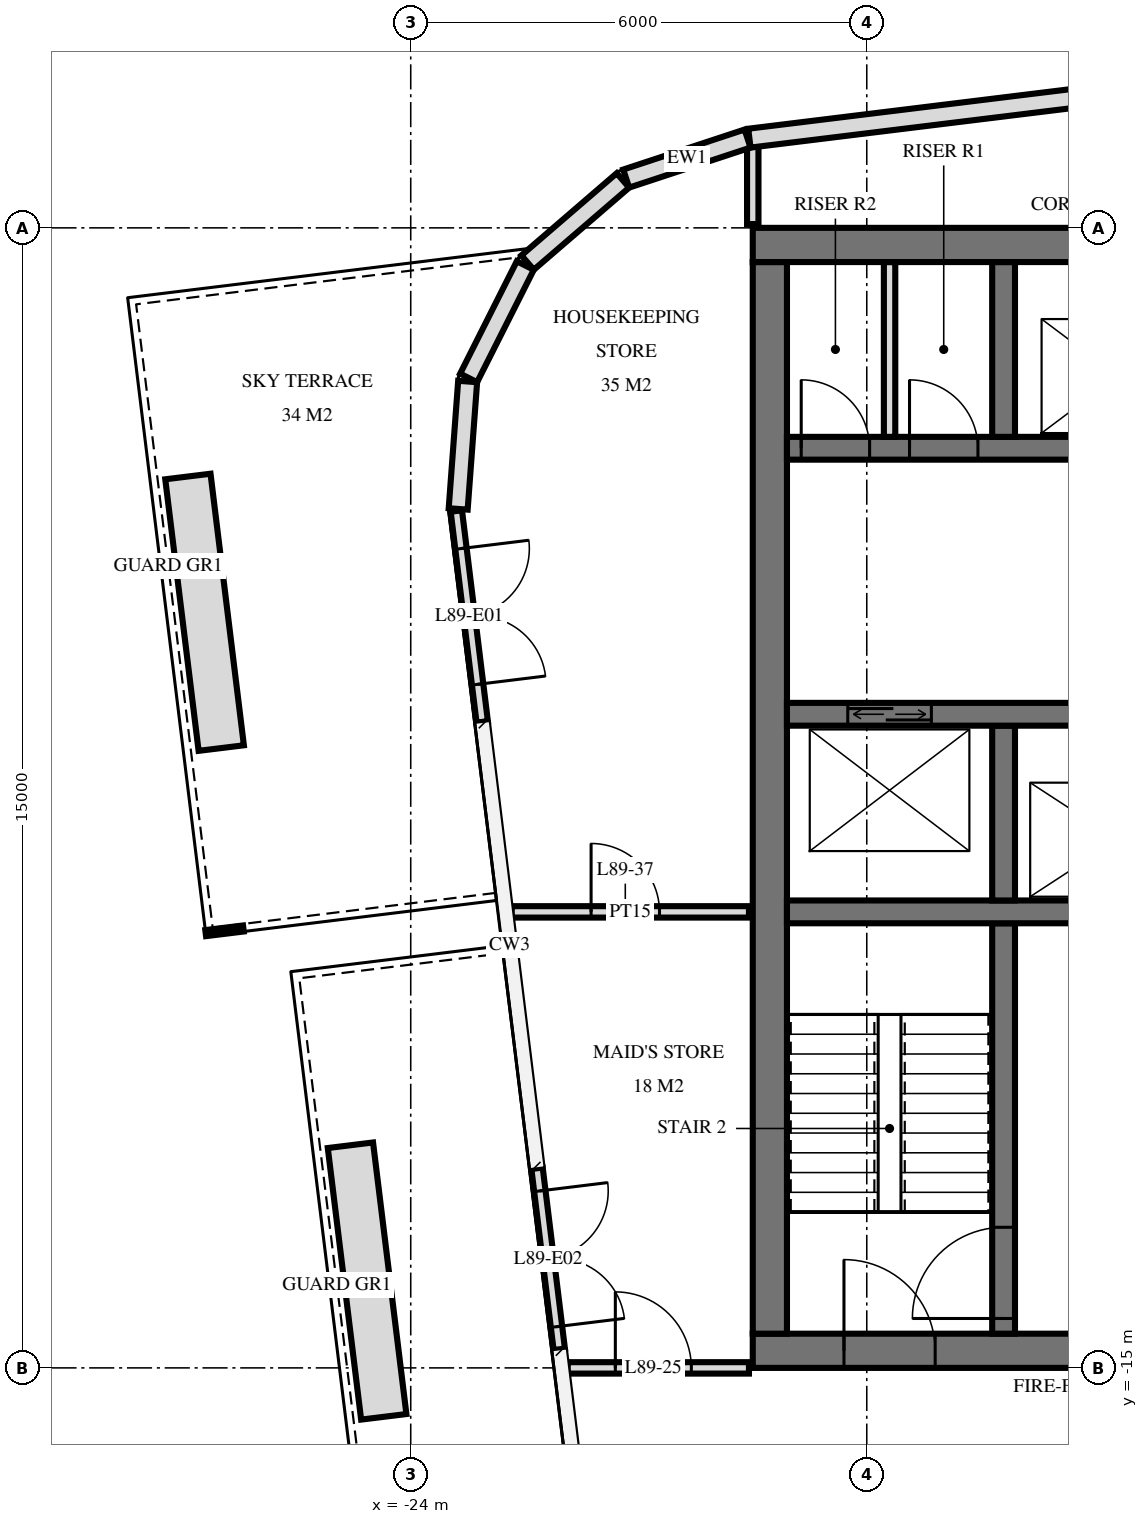
"""IFC4 building model, lengths in metres.
Left out: names, types, materials, properties, quantities, classifications, styles, units other than length and angle.
Written with IfcOpenShell. Run it as: python <this file> out.ifc"""

import sys

from ifc_helpers import new_model, si_unit, direction, frame, frame_2d, origin, place, context, subcontext, project, spatial, rectangle, extrude, element, fill, save


model = new_model("IFC4")
c1 = context("Model", 3, precision=1e-05, world=origin(), true_north=direction((0.0, 1.0)))
c2 = subcontext(c1, "Body", "Model", "MODEL_VIEW")
j1 = project(units=[si_unit("LENGTHUNIT", "METRE"), si_unit("PLANEANGLEUNIT", "RADIAN")], contexts=[c1])
p1 = place(None, origin())
s1 = spatial("IfcSite", under=j1, at=p1, CompositionType="ELEMENT")
p2 = place(p1, origin())
s2 = spatial("IfcBuilding", under=s1, at=p2, CompositionType="ELEMENT")
p3 = place(p2, frame((0.0, 0.0, 338.6)))
s3 = spatial("IfcBuildingStorey", under=s2, at=p3, CompositionType="ELEMENT", Elevation=338.6)
p4 = place(p3, frame((-19.5, -0.225, 0.0), z_axis=(0.0, 0.0, 1.0), x_axis=(1.0, 0.0, 0.0)))
e1 = element("IfcWall", 1, at=p4, inside=s3, PredefinedType="SHEAR", context=c2, shape_type="SweptSolid", body=[
    extrude(rectangle(XDim=9.5, YDim=0.45, at=frame_2d((4.75, 0.0))), origin(), (0.0, 0.0, 1.0), 4.0),
])
p5 = place(p3, frame((-19.5, -14.775, 0.0), z_axis=(0.0, 0.0, 1.0), x_axis=(1.0, 0.0, 0.0)))
e2 = element("IfcWall", 2, at=p5, inside=s3, PredefinedType="SHEAR", context=c2, shape_type="SweptSolid", body=[
    extrude(rectangle(XDim=9.5, YDim=0.45, at=frame_2d((4.75, 0.0))), origin(), (0.0, 0.0, 1.0), 4.0),
])
p6 = place(p5, frame((1.2, 0.0, 0.0)))
e3 = element("IfcOpeningElement", 3, at=p6, cuts=e2, PredefinedType="OPENING", context=c2, shape_type="SweptSolid", body=[
    extrude(rectangle(XDim=1.2, YDim=2.1, at=frame_2d((0.6, 1.05))), frame((0.0, 0.235, 0.0), z_axis=(0.0, -1.0, 0.0), x_axis=(1.0, 0.0, 0.0)), (0.0, 0.0, 1.0), 0.47),
])
p7 = place(p5, frame((4.25, 0.0, 0.0)))
e4 = element("IfcOpeningElement", 4, at=p7, cuts=e2, PredefinedType="OPENING", context=c2, shape_type="SweptSolid", body=[
    extrude(rectangle(XDim=1.1, YDim=2.1, at=frame_2d((0.55, 1.05))), frame((0.0, 0.235, 0.0), z_axis=(0.0, -1.0, 0.0), x_axis=(1.0, 0.0, 0.0)), (0.0, 0.0, 1.0), 0.47),
])
p8 = place(p3, frame((-19.275, -14.55, 0.0), z_axis=(0.0, 0.0, 1.0), x_axis=(0.0, 1.0, 0.0)))
e5 = element("IfcWall", 5, at=p8, inside=s3, PredefinedType="SHEAR", context=c2, shape_type="SweptSolid", body=[
    extrude(rectangle(XDim=14.1, YDim=0.45, at=frame_2d((7.05, 0.0))), origin(), (0.0, 0.0, 1.0), 4.0),
])
p9 = place(p3, frame((-19.05, -2.9, 0.0), z_axis=(0.0, 0.0, 1.0), x_axis=(1.0, 0.0, 0.0)))
e6 = element("IfcWall", 6, at=p9, inside=s3, PredefinedType="SHEAR", context=c2, shape_type="SweptSolid", body=[
    extrude(rectangle(XDim=8.7, YDim=0.3, at=frame_2d((4.35, 0.0))), origin(), (0.0, 0.0, 1.0), 4.0),
])
p10 = place(p9, frame((6.8, 0.0, 0.0)))
e7 = element("IfcOpeningElement", 7, at=p10, cuts=e6, PredefinedType="OPENING", context=c2, shape_type="SweptSolid", body=[
    extrude(rectangle(XDim=1.1, YDim=2.1, at=frame_2d((0.55, 1.05))), frame((0.0, 0.16, 0.0), z_axis=(0.0, -1.0, 0.0), x_axis=(1.0, 0.0, 0.0)), (0.0, 0.0, 1.0), 0.32),
])
p11 = place(p9, frame((3.8, 0.0, 0.0)))
e8 = element("IfcOpeningElement", 8, at=p11, cuts=e6, PredefinedType="OPENING", context=c2, shape_type="SweptSolid", body=[
    extrude(rectangle(XDim=1.1, YDim=2.1, at=frame_2d((0.55, 1.05))), frame((0.0, 0.16, 0.0), z_axis=(0.0, -1.0, 0.0), x_axis=(1.0, 0.0, 0.0)), (0.0, 0.0, 1.0), 0.32),
])
p12 = place(p9, frame((1.613, 0.0, 0.0)))
e9 = element("IfcOpeningElement", 9, at=p12, cuts=e6, PredefinedType="OPENING", context=c2, shape_type="SweptSolid", body=[
    extrude(rectangle(XDim=0.9, YDim=2.1, at=frame_2d((0.45, 1.05))), frame((0.0, 0.16, 0.0), z_axis=(0.0, -1.0, 0.0), x_axis=(1.0, 0.0, 0.0)), (0.0, 0.0, 1.0), 0.32),
])
p13 = place(p9, frame((0.188, 0.0, 0.0)))
e10 = element("IfcOpeningElement", 10, at=p13, cuts=e6, PredefinedType="OPENING", context=c2, shape_type="SweptSolid", body=[
    extrude(rectangle(XDim=0.9, YDim=2.1, at=frame_2d((0.45, 1.05))), frame((0.0, 0.16, 0.0), z_axis=(0.0, -1.0, 0.0), x_axis=(1.0, 0.0, 0.0)), (0.0, 0.0, 1.0), 0.32),
])
p14 = place(p3, frame((-19.05, -6.4, 0.0), z_axis=(0.0, 0.0, 1.0), x_axis=(1.0, 0.0, 0.0)))
e11 = element("IfcWall", 11, at=p14, inside=s3, PredefinedType="SHEAR", context=c2, shape_type="SweptSolid", body=[
    extrude(rectangle(XDim=8.7, YDim=0.3, at=frame_2d((4.35, 0.0))), origin(), (0.0, 0.0, 1.0), 4.0),
])
p15 = place(p14, frame((6.8, 0.0, 0.0)))
e12 = element("IfcOpeningElement", 12, at=p15, cuts=e11, PredefinedType="OPENING", context=c2, shape_type="SweptSolid", body=[
    extrude(rectangle(XDim=1.1, YDim=2.1, at=frame_2d((0.55, 1.05))), frame((0.0, 0.16, 0.0), z_axis=(0.0, -1.0, 0.0), x_axis=(1.0, 0.0, 0.0)), (0.0, 0.0, 1.0), 0.32),
])
p16 = place(p14, frame((0.8, 0.0, 0.0)))
e13 = element("IfcOpeningElement", 13, at=p16, cuts=e11, PredefinedType="OPENING", context=c2, shape_type="SweptSolid", body=[
    extrude(rectangle(XDim=1.1, YDim=2.1, at=frame_2d((0.55, 1.05))), frame((0.0, 0.16, 0.0), z_axis=(0.0, -1.0, 0.0), x_axis=(1.0, 0.0, 0.0)), (0.0, 0.0, 1.0), 0.32),
])
p17 = place(p3, frame((-19.05, -9.0, 0.0), z_axis=(0.0, 0.0, 1.0), x_axis=(1.0, 0.0, 0.0)))
e14 = element("IfcWall", 14, at=p17, inside=s3, PredefinedType="SHEAR", context=c2, shape_type="SweptSolid", body=[
    extrude(rectangle(XDim=8.7, YDim=0.3, at=frame_2d((4.35, 0.0))), origin(), (0.0, 0.0, 1.0), 4.0),
])
p18 = place(p17, frame((3.8, 0.0, 0.0)))
e15 = element("IfcOpeningElement", 15, at=p18, cuts=e14, PredefinedType="OPENING", context=c2, shape_type="SweptSolid", body=[
    extrude(rectangle(XDim=1.1, YDim=2.1, at=frame_2d((0.55, 1.05))), frame((0.0, 0.16, 0.0), z_axis=(0.0, -1.0, 0.0), x_axis=(1.0, 0.0, 0.0)), (0.0, 0.0, 1.0), 0.32),
])
for number, where, z_axis, x_axis in (
    (16, (-16.2, -2.75, 0.0), (0.0, 0.0, 1.0), (0.0, 1.0, 0.0)),
    (17, (-16.2, -8.85, 0.0), (0.0, 0.0, 1.0), (0.0, 1.0, 0.0)),
):
    element("IfcWall", number, at=place(p3, frame(where, z_axis=z_axis, x_axis=x_axis)), inside=s3, PredefinedType="SHEAR", context=c2, shape_type="SweptSolid", body=[
        extrude(rectangle(XDim=2.3, YDim=0.3, at=frame_2d((1.15, 0.0))), origin(), (0.0, 0.0, 1.0), 4.0),
    ])
p19 = place(p3, frame((-16.2, -14.55, 0.0), z_axis=(0.0, 0.0, 1.0), x_axis=(0.0, 1.0, 0.0)))
e18 = element("IfcWall", 18, at=p19, inside=s3, PredefinedType="SHEAR", context=c2, shape_type="SweptSolid", body=[
    extrude(rectangle(XDim=5.4, YDim=0.3, at=frame_2d((2.7, 0.0))), origin(), (0.0, 0.0, 1.0), 4.0),
])
p20 = place(p19, frame((0.2, 0.0, 0.0)))
e19 = element("IfcOpeningElement", 19, at=p20, cuts=e18, PredefinedType="OPENING", context=c2, shape_type="SweptSolid", body=[
    extrude(rectangle(XDim=1.2, YDim=2.1, at=frame_2d((0.6, 1.05))), frame((0.0, 0.16, 0.0), z_axis=(0.0, -1.0, 0.0), x_axis=(1.0, 0.0, 0.0)), (0.0, 0.0, 1.0), 0.32),
])
p21 = place(p3, frame((16.138, 5.561, 0.0), z_axis=(0.0, 0.0, 1.0), x_axis=(-0.992546726876, -0.121864658405, 0.0)))
e20 = element("IfcWall", 20, at=p21, inside=s3, PredefinedType="SOLIDWALL", context=c2, shape_type="SweptSolid", body=[
    extrude(rectangle(XDim=35.951, YDim=0.25, at=frame_2d((17.975, 0.0))), origin(), (0.0, 0.0, 1.0), 3.72),
])
p22 = place(p3, frame((-19.568, 1.175, 0.0), z_axis=(0.0, 0.0, 1.0), x_axis=(-0.949694735798, -0.313177120489, 0.0)))
e21 = element("IfcWall", 21, at=p22, inside=s3, PredefinedType="SOLIDWALL", context=c2, shape_type="SweptSolid", body=[
    extrude(rectangle(XDim=1.681, YDim=0.25, at=frame_2d((0.841, 0.0))), origin(), (0.0, 0.0, 1.0), 3.72),
])
p23 = place(p3, frame((-21.208, 0.624, 0.0), z_axis=(0.0, 0.0, 1.0), x_axis=(-0.757568315466, -0.652755886531, 0.0)))
e22 = element("IfcWall", 22, at=p23, inside=s3, PredefinedType="SOLIDWALL", context=c2, shape_type="SweptSolid", body=[
    extrude(rectangle(XDim=1.656, YDim=0.25, at=frame_2d((0.828, 0.0))), origin(), (0.0, 0.0, 1.0), 3.72),
])
p24 = place(p3, frame((-22.493, -0.495, 0.0), z_axis=(0.0, 0.0, 1.0), x_axis=(-0.449982385812, -0.893037430604, 0.0)))
e23 = element("IfcWall", 23, at=p24, inside=s3, PredefinedType="SOLIDWALL", context=c2, shape_type="SweptSolid", body=[
    extrude(rectangle(XDim=1.656, YDim=0.25, at=frame_2d((0.828, 0.0))), origin(), (0.0, 0.0, 1.0), 3.72),
])
p25 = place(p3, frame((-23.251, -2.021, 0.0), z_axis=(0.0, 0.0, 1.0), x_axis=(-0.074053534713, -0.997254267475, 0.0)))
e24 = element("IfcWall", 24, at=p25, inside=s3, PredefinedType="SOLIDWALL", context=c2, shape_type="SweptSolid", body=[
    extrude(rectangle(XDim=1.681, YDim=0.25, at=frame_2d((0.841, 0.0))), origin(), (0.0, 0.0, 1.0), 3.72),
])
p26 = place(p3, frame((-23.4, -3.726, 0.0), z_axis=(0.0, 0.0, 1.0), x_axis=(0.121830924856, -0.992550868091, 0.0)))
e25 = element("IfcWall", 25, at=p26, inside=s3, PredefinedType="USERDEFINED", context=c2, shape_type="SweptSolid", body=[
    extrude(rectangle(XDim=2.795, YDim=0.15, at=frame_2d((1.398, 0.0))), origin(), (0.0, 0.0, 1.0), 3.72),
])
p27 = place(p26, frame((0.498, 0.0, 0.0)))
e26 = element("IfcOpeningElement", 26, at=p27, cuts=e25, PredefinedType="OPENING", context=c2, shape_type="SweptSolid", body=[
    extrude(rectangle(XDim=1.8, YDim=2.4, at=frame_2d((0.9, 1.2))), frame((0.0, 0.085, 0.0), z_axis=(0.0, -1.0, 0.0), x_axis=(1.0, 0.0, 0.0)), (0.0, 0.0, 1.0), 0.17),
])
p28 = place(p3, frame((-22.338, -12.374, 0.0), z_axis=(0.0, 0.0, 1.0), x_axis=(0.121868445399, -0.992546261902, 0.0)))
e27 = element("IfcWall", 27, at=p28, inside=s3, PredefinedType="USERDEFINED", context=c2, shape_type="SweptSolid", body=[
    extrude(rectangle(XDim=2.4, YDim=0.15, at=frame_2d((1.2, 0.0))), origin(), (0.0, 0.0, 1.0), 3.72),
])
p29 = place(p28, frame((0.3, 0.0, 0.0)))
e28 = element("IfcOpeningElement", 28, at=p29, cuts=e27, PredefinedType="OPENING", context=c2, shape_type="SweptSolid", body=[
    extrude(rectangle(XDim=1.8, YDim=2.4, at=frame_2d((0.9, 1.2))), frame((0.0, 0.085, 0.0), z_axis=(0.0, -1.0, 0.0), x_axis=(1.0, 0.0, 0.0)), (0.0, 0.0, 1.0), 0.17),
])
for number, where, z_axis, x_axis in (
    (29, (-24.355, -15.644, 0.0), (0.0, 0.0, 1.0), (-0.122, 0.993, 0.0)),
    (30, (-26.493, -6.845, 0.0), (0.0, 0.0, 1.0), (-0.122, 0.993, 0.0)),
):
    element("IfcWall", number, at=place(p3, frame(where, z_axis=z_axis, x_axis=x_axis)), inside=s3, PredefinedType="USERDEFINED", context=c2, shape_type="SweptSolid", body=[
        extrude(rectangle(XDim=3.6, YDim=0.6, at=frame_2d((1.8, 0.0))), origin(), (0.0, 0.0, 1.0), 0.65),
    ])
p30 = place(p3, frame((-17.7, -2.75, 0.0), z_axis=(0.0, 0.0, 1.0), x_axis=(0.0, 1.0, 0.0)))
e31 = element("IfcWall", 31, at=p30, inside=s3, PredefinedType="PARTITIONING", context=c2, shape_type="SweptSolid", body=[
    extrude(rectangle(XDim=2.3, YDim=0.15, at=frame_2d((1.15, 0.0))), origin(), (0.0, 0.0, 1.0), 3.7),
])
p31 = place(p3, frame((-19.5, 0.05, 0.0), z_axis=(0.0, 0.0, 1.0), x_axis=(0.0, 1.0, 0.0)))
e32 = element("IfcWall", 32, at=p31, inside=s3, PredefinedType="PARTITIONING", context=c2, shape_type="SweptSolid", body=[
    extrude(rectangle(XDim=1.08, YDim=0.15, at=frame_2d((0.54, 0.0))), origin(), (0.0, 0.0, 1.0), 3.72),
])
p32 = place(p3, frame((-21.935, -15.0, 0.0), z_axis=(0.0, 0.0, 1.0), x_axis=(1.0, 0.0, 0.0)))
e33 = element("IfcWall", 33, at=p32, inside=s3, PredefinedType="PARTITIONING", context=c2, shape_type="SweptSolid", body=[
    extrude(rectangle(XDim=2.385, YDim=0.15, at=frame_2d((1.192, 0.0))), origin(), (0.0, 0.0, 1.0), 3.72),
])
p33 = place(p32, frame((0.627, 0.0, 0.0)))
e34 = element("IfcOpeningElement", 34, at=p33, cuts=e33, PredefinedType="OPENING", context=c2, shape_type="SweptSolid", body=[
    extrude(rectangle(XDim=1.0, YDim=2.1, at=frame_2d((0.5, 1.05))), frame((0.0, 0.085, 0.0), z_axis=(0.0, -1.0, 0.0), x_axis=(1.0, 0.0, 0.0)), (0.0, 0.0, 1.0), 0.17),
])
p34 = place(p3, frame((-22.672, -9.0, 0.0), z_axis=(0.0, 0.0, 1.0), x_axis=(1.0, 0.0, 0.0)))
e35 = element("IfcWall", 35, at=p34, inside=s3, PredefinedType="PARTITIONING", context=c2, shape_type="SweptSolid", body=[
    extrude(rectangle(XDim=3.122, YDim=0.15, at=frame_2d((1.561, 0.0))), origin(), (0.0, 0.0, 1.0), 3.72),
])
p35 = place(p34, frame((1.045, 0.0, 0.0)))
e36 = element("IfcOpeningElement", 36, at=p35, cuts=e35, PredefinedType="OPENING", context=c2, shape_type="SweptSolid", body=[
    extrude(rectangle(XDim=0.9, YDim=2.1, at=frame_2d((0.45, 1.05))), frame((0.0, 0.085, 0.0), z_axis=(0.0, -1.0, 0.0), x_axis=(1.0, 0.0, 0.0)), (0.0, 0.0, 1.0), 0.17),
])
p36 = place(p27, origin())
e37 = element("IfcDoor", 37, at=p36, inside=s3, OperationType="DOUBLE_DOOR_SINGLE_SWING", PredefinedType="DOOR", context=c2, shape_type="SweptSolid", body=[
    extrude(rectangle(XDim=1.8, YDim=2.4, at=frame_2d((0.9, 1.2))), frame((0.0, 0.025, 0.0), z_axis=(0.0, -1.0, 0.0), x_axis=(1.0, 0.0, 0.0)), (0.0, 0.0, 1.0), 0.05),
])
fill(e26, e37)
p37 = place(p29, origin())
e38 = element("IfcDoor", 38, at=p37, inside=s3, OperationType="DOUBLE_DOOR_SINGLE_SWING", PredefinedType="DOOR", context=c2, shape_type="SweptSolid", body=[
    extrude(rectangle(XDim=1.8, YDim=2.4, at=frame_2d((0.9, 1.2))), frame((0.0, 0.025, 0.0), z_axis=(0.0, -1.0, 0.0), x_axis=(1.0, 0.0, 0.0)), (0.0, 0.0, 1.0), 0.05),
])
fill(e28, e38)
p38 = place(p16, origin())
e39 = element("IfcDoor", 39, at=p38, inside=s3, OperationType="DOUBLE_DOOR_SLIDING", PredefinedType="USERDEFINED", context=c2, shape_type="SweptSolid", body=[
    extrude(rectangle(XDim=1.1, YDim=2.1, at=frame_2d((0.55, 1.05))), frame((0.0, 0.025, 0.0), z_axis=(0.0, -1.0, 0.0), x_axis=(1.0, 0.0, 0.0)), (0.0, 0.0, 1.0), 0.05),
])
fill(e13, e39)
p39 = place(p6, origin())
e40 = element("IfcDoor", 40, at=p39, inside=s3, OperationType="SINGLE_SWING_RIGHT", PredefinedType="DOOR", context=c2, shape_type="SweptSolid", body=[
    extrude(rectangle(XDim=1.2, YDim=2.1, at=frame_2d((0.6, 1.05))), frame((0.0, 0.025, 0.0), z_axis=(0.0, -1.0, 0.0), x_axis=(1.0, 0.0, 0.0)), (0.0, 0.0, 1.0), 0.05),
])
fill(e3, e40)
p40 = place(p12, origin())
e41 = element("IfcDoor", 41, at=p40, inside=s3, OperationType="SINGLE_SWING_RIGHT", PredefinedType="DOOR", context=c2, shape_type="SweptSolid", body=[
    extrude(rectangle(XDim=0.9, YDim=2.1, at=frame_2d((0.45, 1.05))), frame((0.0, 0.025, 0.0), z_axis=(0.0, -1.0, 0.0), x_axis=(1.0, 0.0, 0.0)), (0.0, 0.0, 1.0), 0.05),
])
fill(e9, e41)
p41 = place(p13, origin())
e42 = element("IfcDoor", 42, at=p41, inside=s3, OperationType="SINGLE_SWING_RIGHT", PredefinedType="DOOR", context=c2, shape_type="SweptSolid", body=[
    extrude(rectangle(XDim=0.9, YDim=2.1, at=frame_2d((0.45, 1.05))), frame((0.0, 0.025, 0.0), z_axis=(0.0, -1.0, 0.0), x_axis=(1.0, 0.0, 0.0)), (0.0, 0.0, 1.0), 0.05),
])
fill(e10, e42)
p42 = place(p20, origin())
e43 = element("IfcDoor", 43, at=p42, inside=s3, OperationType="SINGLE_SWING_RIGHT", PredefinedType="DOOR", context=c2, shape_type="SweptSolid", body=[
    extrude(rectangle(XDim=1.2, YDim=2.1, at=frame_2d((0.6, 1.05))), frame((0.0, 0.025, 0.0), z_axis=(0.0, -1.0, 0.0), x_axis=(1.0, 0.0, 0.0)), (0.0, 0.0, 1.0), 0.05),
])
fill(e19, e43)
p43 = place(p33, origin())
e44 = element("IfcDoor", 44, at=p43, inside=s3, OperationType="SINGLE_SWING_RIGHT", PredefinedType="DOOR", context=c2, shape_type="SweptSolid", body=[
    extrude(rectangle(XDim=1.0, YDim=2.1, at=frame_2d((0.5, 1.05))), frame((0.0, 0.025, 0.0), z_axis=(0.0, -1.0, 0.0), x_axis=(1.0, 0.0, 0.0)), (0.0, 0.0, 1.0), 0.05),
])
fill(e34, e44)
p44 = place(p35, origin())
e45 = element("IfcDoor", 45, at=p44, inside=s3, OperationType="SINGLE_SWING_RIGHT", PredefinedType="DOOR", context=c2, shape_type="SweptSolid", body=[
    extrude(rectangle(XDim=0.9, YDim=2.1, at=frame_2d((0.45, 1.05))), frame((0.0, 0.025, 0.0), z_axis=(0.0, -1.0, 0.0), x_axis=(1.0, 0.0, 0.0)), (0.0, 0.0, 1.0), 0.05),
])
fill(e36, e45)
save(model, sys.argv[1])
